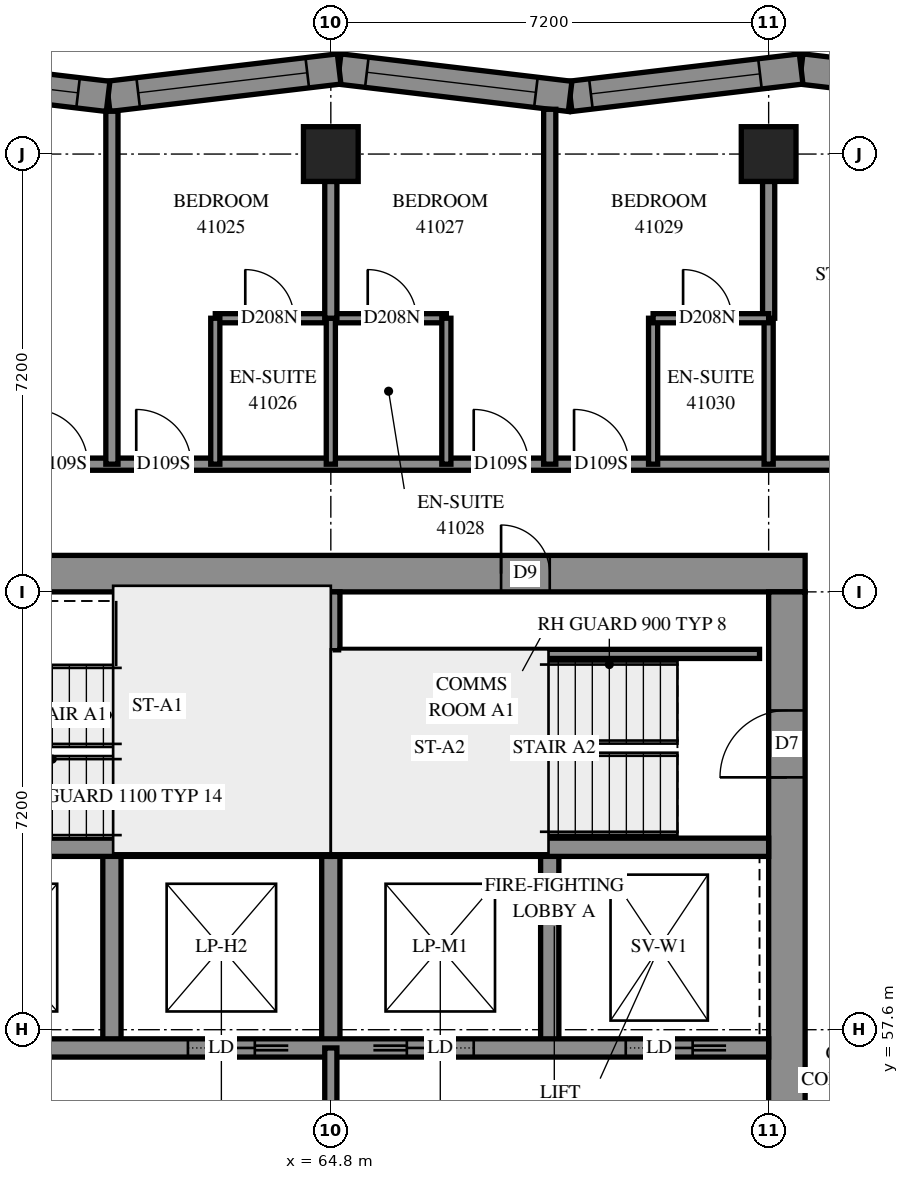
"""IFC4 building model, lengths in metres.
Left out: names, types, materials, properties, quantities, classifications, styles, units other than length and angle.
Written with IfcOpenShell. Run it as: python <this file> out.ifc"""

import sys

from ifc_helpers import new_model, si_unit, direction, frame, frame_2d, origin, origin_2d, place, context, subcontext, project, spatial, polyline, rectangle, outline, extrude, element, fill, save


model = new_model("IFC4")
c1 = context("Model", 3, precision=1e-05, world=origin(), true_north=direction((0.0, 1.0)))
c2 = subcontext(c1, "Body", "Model", "MODEL_VIEW")
j1 = project(units=[si_unit("LENGTHUNIT", "METRE"), si_unit("PLANEANGLEUNIT", "RADIAN")], contexts=[c1])
p1 = place(None, origin())
s1 = spatial("IfcSite", under=j1, at=p1, CompositionType="ELEMENT")
p2 = place(p1, origin())
s2 = spatial("IfcBuilding", under=s1, at=p2, CompositionType="ELEMENT")
p3 = place(p2, frame((0.0, 0.0, 152.4)))
s3 = spatial("IfcBuildingStorey", under=s2, at=p3, CompositionType="ELEMENT", Elevation=152.4)
for number, where, z_axis, x_axis in (
    (1, (64.8, 72.0, 0.0), (0.0, 0.0, 1.0), (1.0, 0.0, 0.0)),
    (2, (72.0, 72.0, 0.0), (0.0, 0.0, 1.0), (1.0, 0.0, 0.0)),
):
    element("IfcColumn", number, at=place(p3, frame(where, z_axis=z_axis, x_axis=x_axis)), inside=s3, PredefinedType="COLUMN", context=c2, shape_type="SweptSolid", body=[
        extrude(rectangle(XDim=0.9, YDim=0.9, at=origin_2d()), origin(), (0.0, 0.0, 1.0), 3.1),
    ])
p4 = place(p3, frame((57.0, 65.1, -0.3), z_axis=(0.0, 0.0, 1.0), x_axis=(1.0, 0.0, 0.0)))
e3 = element("IfcWall", 3, at=p4, inside=s3, PredefinedType="SHEAR", context=c2, shape_type="SweptSolid", body=[
    extrude(rectangle(XDim=15.6, YDim=0.6, at=frame_2d((7.8, 0.0))), origin(), (0.0, 0.0, 1.0), 2.7),
])
p5 = place(p4, frame((10.6, 0.0, 0.3)))
e4 = element("IfcOpeningElement", 4, at=p5, cuts=e3, PredefinedType="OPENING", context=c2, shape_type="SweptSolid", body=[
    extrude(rectangle(XDim=0.8, YDim=2.1, at=frame_2d((0.4, 1.05))), frame((0.0, 0.31, 0.0), z_axis=(0.0, -1.0, 0.0), x_axis=(1.0, 0.0, 0.0)), (0.0, 0.0, 1.0), 0.62),
])
p6 = place(p3, frame((72.3, 50.4, -0.3), z_axis=(0.0, 0.0, 1.0), x_axis=(0.0, 1.0, 0.0)))
e5 = element("IfcWall", 5, at=p6, inside=s3, PredefinedType="SHEAR", context=c2, shape_type="SweptSolid", body=[
    extrude(rectangle(XDim=14.4, YDim=0.6, at=frame_2d((7.2, 0.0))), origin(), (0.0, 0.0, 1.0), 2.7),
])
p7 = place(p6, frame((4.55, 0.0, 0.3)))
e6 = element("IfcOpeningElement", 6, at=p7, cuts=e5, PredefinedType="OPENING", context=c2, shape_type="SweptSolid", body=[
    extrude(rectangle(XDim=1.1, YDim=2.1, at=frame_2d((0.55, 1.05))), frame((0.0, 0.31, 0.0), z_axis=(0.0, -1.0, 0.0), x_axis=(1.0, 0.0, 0.0)), (0.0, 0.0, 1.0), 0.62),
])
p8 = place(p6, frame((11.35, 0.0, 0.3)))
e7 = element("IfcOpeningElement", 7, at=p8, cuts=e5, PredefinedType="OPENING", context=c2, shape_type="SweptSolid", body=[
    extrude(rectangle(XDim=1.1, YDim=2.1, at=frame_2d((0.55, 1.05))), frame((0.0, 0.31, 0.0), z_axis=(0.0, -1.0, 0.0), x_axis=(1.0, 0.0, 0.0)), (0.0, 0.0, 1.0), 0.62),
])
for number, where, z_axis, x_axis in (
    (8, (61.2, 57.3, 0.0), (0.0, 0.0, 1.0), (0.0, 1.0, 0.0)),
    (9, (64.8, 57.3, 0.0), (0.0, 0.0, 1.0), (0.0, 1.0, 0.0)),
    (10, (68.4, 57.3, 0.0), (0.0, 0.0, 1.0), (0.0, 1.0, 0.0)),
):
    element("IfcWall", number, at=place(p3, frame(where, z_axis=z_axis, x_axis=x_axis)), inside=s3, PredefinedType="SOLIDWALL", context=c2, shape_type="SweptSolid", body=[
        extrude(rectangle(XDim=3.3, YDim=0.3, at=frame_2d((1.65, 0.0))), origin(), (0.0, 0.0, 1.0), 3.1),
    ])
p9 = place(p3, frame((57.6, 57.3, 0.0), z_axis=(0.0, 0.0, 1.0), x_axis=(1.0, 0.0, 0.0)))
e11 = element("IfcWall", 11, at=p9, inside=s3, PredefinedType="SOLIDWALL", context=c2, shape_type="SweptSolid", body=[
    extrude(rectangle(XDim=14.4, YDim=0.3, at=frame_2d((7.2, 0.0))), origin(), (0.0, 0.0, 1.0), 3.1),
])
p10 = place(p9, frame((1.25, 0.0, 0.0)))
e12 = element("IfcOpeningElement", 12, at=p10, cuts=e11, PredefinedType="OPENING", context=c2, shape_type="SweptSolid", body=[
    extrude(rectangle(XDim=1.1, YDim=2.1, at=frame_2d((0.55, 1.05))), frame((0.0, 0.16, 0.0), z_axis=(0.0, -1.0, 0.0), x_axis=(1.0, 0.0, 0.0)), (0.0, 0.0, 1.0), 0.32),
])
p11 = place(p9, frame((4.85, 0.0, 0.0)))
e13 = element("IfcOpeningElement", 13, at=p11, cuts=e11, PredefinedType="OPENING", context=c2, shape_type="SweptSolid", body=[
    extrude(rectangle(XDim=1.1, YDim=2.1, at=frame_2d((0.55, 1.05))), frame((0.0, 0.16, 0.0), z_axis=(0.0, -1.0, 0.0), x_axis=(1.0, 0.0, 0.0)), (0.0, 0.0, 1.0), 0.32),
])
p12 = place(p9, frame((8.45, 0.0, 0.0)))
e14 = element("IfcOpeningElement", 14, at=p12, cuts=e11, PredefinedType="OPENING", context=c2, shape_type="SweptSolid", body=[
    extrude(rectangle(XDim=1.1, YDim=2.1, at=frame_2d((0.55, 1.05))), frame((0.0, 0.16, 0.0), z_axis=(0.0, -1.0, 0.0), x_axis=(1.0, 0.0, 0.0)), (0.0, 0.0, 1.0), 0.32),
])
p13 = place(p9, frame((12.05, 0.0, 0.0)))
e15 = element("IfcOpeningElement", 15, at=p13, cuts=e11, PredefinedType="OPENING", context=c2, shape_type="SweptSolid", body=[
    extrude(rectangle(XDim=1.1, YDim=2.1, at=frame_2d((0.55, 1.05))), frame((0.0, 0.16, 0.0), z_axis=(0.0, -1.0, 0.0), x_axis=(1.0, 0.0, 0.0)), (0.0, 0.0, 1.0), 0.32),
])
for number, where, z_axis, x_axis in (
    (16, (57.6, 60.6, 0.0), (0.0, 0.0, 1.0), (1.0, 0.0, 0.0)),
    (17, (64.8, 60.6, 0.0), (0.0, 0.0, 1.0), (1.0, 0.0, 0.0)),
):
    element("IfcWall", number, at=place(p3, frame(where, z_axis=z_axis, x_axis=x_axis)), inside=s3, PredefinedType="SOLIDWALL", context=c2, shape_type="SweptSolid", body=[
        extrude(rectangle(XDim=7.2, YDim=0.3, at=frame_2d((3.6, 0.0))), origin(), (0.0, 0.0, 1.0), 3.1),
    ])
p14 = place(p3, frame((64.8, 60.6, 0.0), z_axis=(0.0, 0.0, 1.0), x_axis=(0.0, 1.0, 0.0)))
e18 = element("IfcWall", 18, at=p14, inside=s3, PredefinedType="SOLIDWALL", context=c2, shape_type="SweptSolid", body=[
    extrude(rectangle(XDim=4.2, YDim=0.3, at=frame_2d((2.1, 0.0))), origin(), (0.0, 0.0, 1.0), 3.1),
])
p15 = place(p3, frame((76.353, 72.946, 0.0), z_axis=(0.0, 0.0, 1.0), x_axis=(-0.9930297168, 0.1178642505, 0.0)))
e19 = element("IfcWall", 19, at=p15, inside=s3, PredefinedType="SOLIDWALL", context=c2, shape_type="SweptSolid", body=[
    extrude(outline(polyline([(0.049, -0.25), (3.875, -0.25), (3.815, 0.25), (-0.049, 0.25), (0.049, -0.25)])), origin(), (0.0, 0.0, 1.0), 3.1),
])
p16 = place(p15, frame((1.587, 0.0, 0.45)))
e20 = element("IfcOpeningElement", 20, at=p16, cuts=e19, PredefinedType="OPENING", context=c2, shape_type="SweptSolid", body=[
    extrude(rectangle(XDim=1.2, YDim=2.5, at=frame_2d((0.6, 1.25))), frame((0.0, 0.26, 0.0), z_axis=(0.0, -1.0, 0.0), x_axis=(1.0, 0.0, 0.0)), (0.0, 0.0, 1.0), 0.52),
])
p17 = place(p3, frame((72.534, 73.399, 0.0), z_axis=(0.0, 0.0, 1.0), x_axis=(-0.9930269402, -0.1178876415, 0.0)))
e21 = element("IfcWall", 21, at=p17, inside=s3, PredefinedType="SOLIDWALL", context=c2, shape_type="SweptSolid", body=[
    extrude(outline(polyline([(-0.03, -0.25), (3.796, -0.25), (3.855, 0.25), (0.03, 0.25), (-0.03, -0.25)])), origin(), (0.0, 0.0, 1.0), 3.1),
])
p18 = place(p17, frame((0.682, 0.0, 0.45)))
e22 = element("IfcOpeningElement", 22, at=p18, cuts=e21, PredefinedType="OPENING", context=c2, shape_type="SweptSolid", body=[
    extrude(rectangle(XDim=2.8, YDim=2.5, at=frame_2d((1.4, 1.25))), frame((0.0, 0.26, 0.0), z_axis=(0.0, -1.0, 0.0), x_axis=(1.0, 0.0, 0.0)), (0.0, 0.0, 1.0), 0.52),
])
p19 = place(p3, frame((68.736, 72.948, 0.0), z_axis=(0.0, 0.0, 1.0), x_axis=(-0.9930265769, 0.1178907016, 0.0)))
e23 = element("IfcWall", 23, at=p19, inside=s3, PredefinedType="SOLIDWALL", context=c2, shape_type="SweptSolid", body=[
    extrude(outline(polyline([(0.03, -0.25), (3.855, -0.25), (3.796, 0.25), (-0.03, 0.25), (0.03, -0.25)])), origin(), (0.0, 0.0, 1.0), 3.1),
])
p20 = place(p19, frame((0.567, 0.0, 0.45)))
e24 = element("IfcOpeningElement", 24, at=p20, cuts=e23, PredefinedType="OPENING", context=c2, shape_type="SweptSolid", body=[
    extrude(rectangle(XDim=2.8, YDim=2.5, at=frame_2d((1.4, 1.25))), frame((0.0, 0.26, 0.0), z_axis=(0.0, -1.0, 0.0), x_axis=(1.0, 0.0, 0.0)), (0.0, 0.0, 1.0), 0.52),
])
p21 = place(p3, frame((64.937, 73.399, 0.0), z_axis=(0.0, 0.0, 1.0), x_axis=(-0.9930269402, -0.1178876415, 0.0)))
e25 = element("IfcWall", 25, at=p21, inside=s3, PredefinedType="SOLIDWALL", context=c2, shape_type="SweptSolid", body=[
    extrude(outline(polyline([(-0.03, -0.25), (3.796, -0.25), (3.855, 0.25), (0.03, 0.25), (-0.03, -0.25)])), origin(), (0.0, 0.0, 1.0), 3.1),
])
p22 = place(p21, frame((0.528, 0.0, 0.45)))
e26 = element("IfcOpeningElement", 26, at=p22, cuts=e25, PredefinedType="OPENING", context=c2, shape_type="SweptSolid", body=[
    extrude(rectangle(XDim=2.8, YDim=2.5, at=frame_2d((1.4, 1.25))), frame((0.0, 0.26, 0.0), z_axis=(0.0, -1.0, 0.0), x_axis=(1.0, 0.0, 0.0)), (0.0, 0.0, 1.0), 0.52),
])
p23 = place(p3, frame((61.138, 72.948, 0.0), z_axis=(0.0, 0.0, 1.0), x_axis=(-0.9930269402, 0.1178876415, 0.0)))
e27 = element("IfcWall", 27, at=p23, inside=s3, PredefinedType="SOLIDWALL", context=c2, shape_type="SweptSolid", body=[
    extrude(outline(polyline([(0.03, -0.25), (3.855, -0.25), (3.796, 0.25), (-0.03, 0.25), (0.03, -0.25)])), origin(), (0.0, 0.0, 1.0), 3.1),
])
p24 = place(p23, frame((0.498, 0.0, 0.45)))
e28 = element("IfcOpeningElement", 28, at=p24, cuts=e27, PredefinedType="OPENING", context=c2, shape_type="SweptSolid", body=[
    extrude(rectangle(XDim=2.8, YDim=2.5, at=frame_2d((1.4, 1.25))), frame((0.0, 0.26, 0.0), z_axis=(0.0, -1.0, 0.0), x_axis=(1.0, 0.0, 0.0)), (0.0, 0.0, 1.0), 0.52),
])
p25 = place(p3, frame((64.95, 63.78, 0.0), z_axis=(0.0, 0.0, 1.0), x_axis=(1.0, 0.0, 0.0)))
e29 = element("IfcWall", 29, at=p25, inside=s3, PredefinedType="PARTITIONING", context=c2, shape_type="SweptSolid", body=[
    extrude(rectangle(XDim=6.9, YDim=0.15, at=frame_2d((3.45, 0.0))), origin(), (0.0, 0.0, 1.0), 3.1),
])
p26 = place(p3, frame((64.8, 53.7, 0.0), z_axis=(0.0, 0.0, 1.0), x_axis=(0.0, 1.0, 0.0)))
e30 = element("IfcWall", 30, at=p26, inside=s3, PredefinedType="PARTITIONING", context=c2, shape_type="SweptSolid", body=[
    extrude(rectangle(XDim=3.6, YDim=0.2, at=frame_2d((1.8, 0.0))), origin(), (0.0, 0.0, 1.0), 3.1),
])
p27 = place(p3, frame((55.5, 66.9, 0.0), z_axis=(0.0, 0.0, 1.0), x_axis=(1.0, 0.0, 0.0)))
e31 = element("IfcWall", 31, at=p27, inside=s3, PredefinedType="PARTITIONING", context=c2, shape_type="SweptSolid", body=[
    extrude(rectangle(XDim=18.6, YDim=0.2, at=frame_2d((9.3, 0.0))), origin(), (0.0, 0.0, 1.0), 3.1),
])
p28 = place(p27, frame((4.4, 0.0, 0.0)))
e32 = element("IfcOpeningElement", 32, at=p28, cuts=e31, PredefinedType="OPENING", context=c2, shape_type="SweptSolid", body=[
    extrude(rectangle(XDim=0.9, YDim=2.1, at=frame_2d((0.45, 1.05))), frame((0.0, 0.11, 0.0), z_axis=(0.0, -1.0, 0.0), x_axis=(1.0, 0.0, 0.0)), (0.0, 0.0, 1.0), 0.22),
])
p29 = place(p27, frame((6.1, 0.0, 0.0)))
e33 = element("IfcOpeningElement", 33, at=p29, cuts=e31, PredefinedType="OPENING", context=c2, shape_type="SweptSolid", body=[
    extrude(rectangle(XDim=0.9, YDim=2.1, at=frame_2d((0.45, 1.05))), frame((0.0, 0.11, 0.0), z_axis=(0.0, -1.0, 0.0), x_axis=(1.0, 0.0, 0.0)), (0.0, 0.0, 1.0), 0.22),
])
p30 = place(p27, frame((11.65, 0.0, 0.0)))
e34 = element("IfcOpeningElement", 34, at=p30, cuts=e31, PredefinedType="OPENING", context=c2, shape_type="SweptSolid", body=[
    extrude(rectangle(XDim=0.9, YDim=2.1, at=frame_2d((0.45, 1.05))), frame((0.0, 0.11, 0.0), z_axis=(0.0, -1.0, 0.0), x_axis=(1.0, 0.0, 0.0)), (0.0, 0.0, 1.0), 0.22),
])
p31 = place(p27, frame((13.3, 0.0, 0.0)))
e35 = element("IfcOpeningElement", 35, at=p31, cuts=e31, PredefinedType="OPENING", context=c2, shape_type="SweptSolid", body=[
    extrude(rectangle(XDim=0.9, YDim=2.1, at=frame_2d((0.45, 1.05))), frame((0.0, 0.11, 0.0), z_axis=(0.0, -1.0, 0.0), x_axis=(1.0, 0.0, 0.0)), (0.0, 0.0, 1.0), 0.22),
])
p32 = place(p3, frame((68.4, 66.9, 0.0), z_axis=(0.0, 0.0, 1.0), x_axis=(0.0, 1.0, 0.0)))
e36 = element("IfcWall", 36, at=p32, inside=s3, PredefinedType="PARTITIONING", context=c2, shape_type="SweptSolid", body=[
    extrude(rectangle(XDim=5.836, YDim=0.2, at=frame_2d((2.918, 0.0))), origin(), (0.0, 0.0, 1.0), 3.1),
])
p33 = place(p3, frame((61.2, 66.9, 0.0), z_axis=(0.0, 0.0, 1.0), x_axis=(0.0, 1.0, 0.0)))
e37 = element("IfcWall", 37, at=p33, inside=s3, PredefinedType="PARTITIONING", context=c2, shape_type="SweptSolid", body=[
    extrude(rectangle(XDim=5.804, YDim=0.2, at=frame_2d((2.902, 0.0))), origin(), (0.0, 0.0, 1.0), 3.1),
])
p34 = place(p3, frame((62.9, 69.3, 0.0), z_axis=(0.0, 0.0, 1.0), x_axis=(1.0, 0.0, 0.0)))
e38 = element("IfcWall", 38, at=p34, inside=s3, PredefinedType="PARTITIONING", context=c2, shape_type="SweptSolid", body=[
    extrude(rectangle(XDim=3.8, YDim=0.15, at=frame_2d((1.9, 0.0))), origin(), (0.0, 0.0, 1.0), 3.1),
])
p35 = place(p34, frame((0.493, 0.0, 0.0)))
e39 = element("IfcOpeningElement", 39, at=p35, cuts=e38, PredefinedType="OPENING", context=c2, shape_type="SweptSolid", body=[
    extrude(rectangle(XDim=0.8, YDim=2.1, at=frame_2d((0.4, 1.05))), frame((0.0, 0.085, 0.0), z_axis=(0.0, -1.0, 0.0), x_axis=(1.0, 0.0, 0.0)), (0.0, 0.0, 1.0), 0.17),
])
p36 = place(p34, frame((2.507, 0.0, 0.0)))
e40 = element("IfcOpeningElement", 40, at=p36, cuts=e38, PredefinedType="OPENING", context=c2, shape_type="SweptSolid", body=[
    extrude(rectangle(XDim=0.8, YDim=2.1, at=frame_2d((0.4, 1.05))), frame((0.0, 0.085, 0.0), z_axis=(0.0, -1.0, 0.0), x_axis=(1.0, 0.0, 0.0)), (0.0, 0.0, 1.0), 0.17),
])
for number, where, z_axis, x_axis in (
    (41, (62.9, 66.9, 0.0), (0.0, 0.0, 1.0), (0.0, 1.0, 0.0)),
    (42, (64.8, 66.9, 0.0), (0.0, 0.0, 1.0), (0.0, 1.0, 0.0)),
    (43, (66.7, 66.9, 0.0), (0.0, 0.0, 1.0), (0.0, 1.0, 0.0)),
    (44, (70.1, 66.9, 0.0), (0.0, 0.0, 1.0), (0.0, 1.0, 0.0)),
    (45, (72.0, 66.9, 0.0), (0.0, 0.0, 1.0), (0.0, 1.0, 0.0)),
):
    element("IfcWall", number, at=place(p3, frame(where, z_axis=z_axis, x_axis=x_axis)), inside=s3, PredefinedType="PARTITIONING", context=c2, shape_type="SweptSolid", body=[
        extrude(rectangle(XDim=2.4, YDim=0.15, at=frame_2d((1.2, 0.0))), origin(), (0.0, 0.0, 1.0), 3.1),
    ])
for number, where, z_axis, x_axis in (
    (46, (64.8, 69.3, 0.0), (0.0, 0.0, 1.0), (0.0, 1.0, 0.0)),
    (47, (72.0, 69.3, 0.0), (0.0, 0.0, 1.0), (0.0, 1.0, 0.0)),
):
    element("IfcWall", number, at=place(p3, frame(where, z_axis=z_axis, x_axis=x_axis)), inside=s3, PredefinedType="PARTITIONING", context=c2, shape_type="SweptSolid", body=[
        extrude(rectangle(XDim=2.25, YDim=0.2, at=frame_2d((1.125, 0.0))), origin(), (0.0, 0.0, 1.0), 3.1),
    ])
p37 = place(p3, frame((70.1, 69.3, 0.0), z_axis=(0.0, 0.0, 1.0), x_axis=(1.0, 0.0, 0.0)))
e48 = element("IfcWall", 48, at=p37, inside=s3, PredefinedType="PARTITIONING", context=c2, shape_type="SweptSolid", body=[
    extrude(rectangle(XDim=1.9, YDim=0.15, at=frame_2d((0.95, 0.0))), origin(), (0.0, 0.0, 1.0), 3.1),
])
p38 = place(p37, frame((0.493, 0.0, 0.0)))
e49 = element("IfcOpeningElement", 49, at=p38, cuts=e48, PredefinedType="OPENING", context=c2, shape_type="SweptSolid", body=[
    extrude(rectangle(XDim=0.8, YDim=2.1, at=frame_2d((0.4, 1.05))), frame((0.0, 0.085, 0.0), z_axis=(0.0, -1.0, 0.0), x_axis=(1.0, 0.0, 0.0)), (0.0, 0.0, 1.0), 0.17),
])
p39 = place(p18, origin())
e50 = element("IfcWindow", 50, at=p39, inside=s3, PartitioningType="SINGLE_PANEL", PredefinedType="WINDOW", context=c2, shape_type="SweptSolid", body=[
    extrude(rectangle(XDim=2.8, YDim=2.5, at=frame_2d((1.4, 1.25))), frame((0.0, 0.18, 0.0), z_axis=(0.0, -1.0, 0.0), x_axis=(1.0, 0.0, 0.0)), (0.0, 0.0, 1.0), 0.06),
])
fill(e22, e50)
p40 = place(p20, origin())
e51 = element("IfcWindow", 51, at=p40, inside=s3, PartitioningType="SINGLE_PANEL", PredefinedType="WINDOW", context=c2, shape_type="SweptSolid", body=[
    extrude(rectangle(XDim=2.8, YDim=2.5, at=frame_2d((1.4, 1.25))), frame((0.0, 0.18, 0.0), z_axis=(0.0, -1.0, 0.0), x_axis=(1.0, 0.0, 0.0)), (0.0, 0.0, 1.0), 0.06),
])
fill(e24, e51)
p41 = place(p22, origin())
e52 = element("IfcWindow", 52, at=p41, inside=s3, PartitioningType="SINGLE_PANEL", PredefinedType="WINDOW", context=c2, shape_type="SweptSolid", body=[
    extrude(rectangle(XDim=2.8, YDim=2.5, at=frame_2d((1.4, 1.25))), frame((0.0, 0.18, 0.0), z_axis=(0.0, -1.0, 0.0), x_axis=(1.0, 0.0, 0.0)), (0.0, 0.0, 1.0), 0.06),
])
fill(e26, e52)
p42 = place(p24, origin())
e53 = element("IfcWindow", 53, at=p42, inside=s3, PartitioningType="SINGLE_PANEL", PredefinedType="WINDOW", context=c2, shape_type="SweptSolid", body=[
    extrude(rectangle(XDim=2.8, YDim=2.5, at=frame_2d((1.4, 1.25))), frame((0.0, 0.18, 0.0), z_axis=(0.0, -1.0, 0.0), x_axis=(1.0, 0.0, 0.0)), (0.0, 0.0, 1.0), 0.06),
])
fill(e28, e53)
p43 = place(p5, origin())
e54 = element("IfcDoor", 54, at=p43, inside=s3, OperationType="SINGLE_SWING_RIGHT", PredefinedType="DOOR", context=c2, shape_type="SweptSolid", body=[
    extrude(rectangle(XDim=0.8, YDim=2.1, at=frame_2d((0.4, 1.05))), frame((0.0, 0.025, 0.0), z_axis=(0.0, -1.0, 0.0), x_axis=(1.0, 0.0, 0.0)), (0.0, 0.0, 1.0), 0.05),
])
fill(e4, e54)
p44 = place(p8, origin())
e55 = element("IfcDoor", 55, at=p44, inside=s3, OperationType="SINGLE_SWING_RIGHT", PredefinedType="DOOR", context=c2, shape_type="SweptSolid", body=[
    extrude(rectangle(XDim=1.1, YDim=2.1, at=frame_2d((0.55, 1.05))), frame((0.0, 0.025, 0.0), z_axis=(0.0, -1.0, 0.0), x_axis=(1.0, 0.0, 0.0)), (0.0, 0.0, 1.0), 0.05),
])
fill(e7, e55)
p45 = place(p11, origin())
e56 = element("IfcDoor", 56, at=p45, inside=s3, OperationType="SLIDING_TO_RIGHT", PredefinedType="DOOR", context=c2, shape_type="SweptSolid", body=[
    extrude(rectangle(XDim=1.1, YDim=2.1, at=frame_2d((0.55, 1.05))), frame((0.0, 0.025, 0.0), z_axis=(0.0, -1.0, 0.0), x_axis=(1.0, 0.0, 0.0)), (0.0, 0.0, 1.0), 0.05),
])
fill(e13, e56)
p46 = place(p12, origin())
e57 = element("IfcDoor", 57, at=p46, inside=s3, OperationType="SLIDING_TO_LEFT", PredefinedType="DOOR", context=c2, shape_type="SweptSolid", body=[
    extrude(rectangle(XDim=1.1, YDim=2.1, at=frame_2d((0.55, 1.05))), frame((0.0, 0.025, 0.0), z_axis=(0.0, -1.0, 0.0), x_axis=(1.0, 0.0, 0.0)), (0.0, 0.0, 1.0), 0.05),
])
fill(e14, e57)
p47 = place(p13, origin())
e58 = element("IfcDoor", 58, at=p47, inside=s3, OperationType="SLIDING_TO_RIGHT", PredefinedType="DOOR", context=c2, shape_type="SweptSolid", body=[
    extrude(rectangle(XDim=1.1, YDim=2.1, at=frame_2d((0.55, 1.05))), frame((0.0, 0.025, 0.0), z_axis=(0.0, -1.0, 0.0), x_axis=(1.0, 0.0, 0.0)), (0.0, 0.0, 1.0), 0.05),
])
fill(e15, e58)
p48 = place(p28, origin())
e59 = element("IfcDoor", 59, at=p48, inside=s3, OperationType="SINGLE_SWING_RIGHT", PredefinedType="DOOR", context=c2, shape_type="SweptSolid", body=[
    extrude(rectangle(XDim=0.9, YDim=2.1, at=frame_2d((0.45, 1.05))), frame((0.0, 0.025, 0.0), z_axis=(0.0, -1.0, 0.0), x_axis=(1.0, 0.0, 0.0)), (0.0, 0.0, 1.0), 0.05),
])
fill(e32, e59)
p49 = place(p29, origin())
e60 = element("IfcDoor", 60, at=p49, inside=s3, OperationType="SINGLE_SWING_LEFT", PredefinedType="DOOR", context=c2, shape_type="SweptSolid", body=[
    extrude(rectangle(XDim=0.9, YDim=2.1, at=frame_2d((0.45, 1.05))), frame((0.0, 0.025, 0.0), z_axis=(0.0, -1.0, 0.0), x_axis=(1.0, 0.0, 0.0)), (0.0, 0.0, 1.0), 0.05),
])
fill(e33, e60)
p50 = place(p35, origin())
e61 = element("IfcDoor", 61, at=p50, inside=s3, OperationType="SINGLE_SWING_RIGHT", PredefinedType="DOOR", context=c2, shape_type="SweptSolid", body=[
    extrude(rectangle(XDim=0.8, YDim=2.1, at=frame_2d((0.4, 1.05))), frame((0.0, 0.025, 0.0), z_axis=(0.0, -1.0, 0.0), x_axis=(1.0, 0.0, 0.0)), (0.0, 0.0, 1.0), 0.05),
])
fill(e39, e61)
p51 = place(p30, origin())
e62 = element("IfcDoor", 62, at=p51, inside=s3, OperationType="SINGLE_SWING_RIGHT", PredefinedType="DOOR", context=c2, shape_type="SweptSolid", body=[
    extrude(rectangle(XDim=0.9, YDim=2.1, at=frame_2d((0.45, 1.05))), frame((0.0, 0.025, 0.0), z_axis=(0.0, -1.0, 0.0), x_axis=(1.0, 0.0, 0.0)), (0.0, 0.0, 1.0), 0.05),
])
fill(e34, e62)
p52 = place(p36, origin())
e63 = element("IfcDoor", 63, at=p52, inside=s3, OperationType="SINGLE_SWING_RIGHT", PredefinedType="DOOR", context=c2, shape_type="SweptSolid", body=[
    extrude(rectangle(XDim=0.8, YDim=2.1, at=frame_2d((0.4, 1.05))), frame((0.0, 0.025, 0.0), z_axis=(0.0, -1.0, 0.0), x_axis=(1.0, 0.0, 0.0)), (0.0, 0.0, 1.0), 0.05),
])
fill(e40, e63)
p53 = place(p31, origin())
e64 = element("IfcDoor", 64, at=p53, inside=s3, OperationType="SINGLE_SWING_LEFT", PredefinedType="DOOR", context=c2, shape_type="SweptSolid", body=[
    extrude(rectangle(XDim=0.9, YDim=2.1, at=frame_2d((0.45, 1.05))), frame((0.0, 0.025, 0.0), z_axis=(0.0, -1.0, 0.0), x_axis=(1.0, 0.0, 0.0)), (0.0, 0.0, 1.0), 0.05),
])
fill(e35, e64)
p54 = place(p38, origin())
e65 = element("IfcDoor", 65, at=p54, inside=s3, OperationType="SINGLE_SWING_RIGHT", PredefinedType="DOOR", context=c2, shape_type="SweptSolid", body=[
    extrude(rectangle(XDim=0.8, YDim=2.1, at=frame_2d((0.4, 1.05))), frame((0.0, 0.025, 0.0), z_axis=(0.0, -1.0, 0.0), x_axis=(1.0, 0.0, 0.0)), (0.0, 0.0, 1.0), 0.05),
])
fill(e49, e65)
save(model, sys.argv[1])
